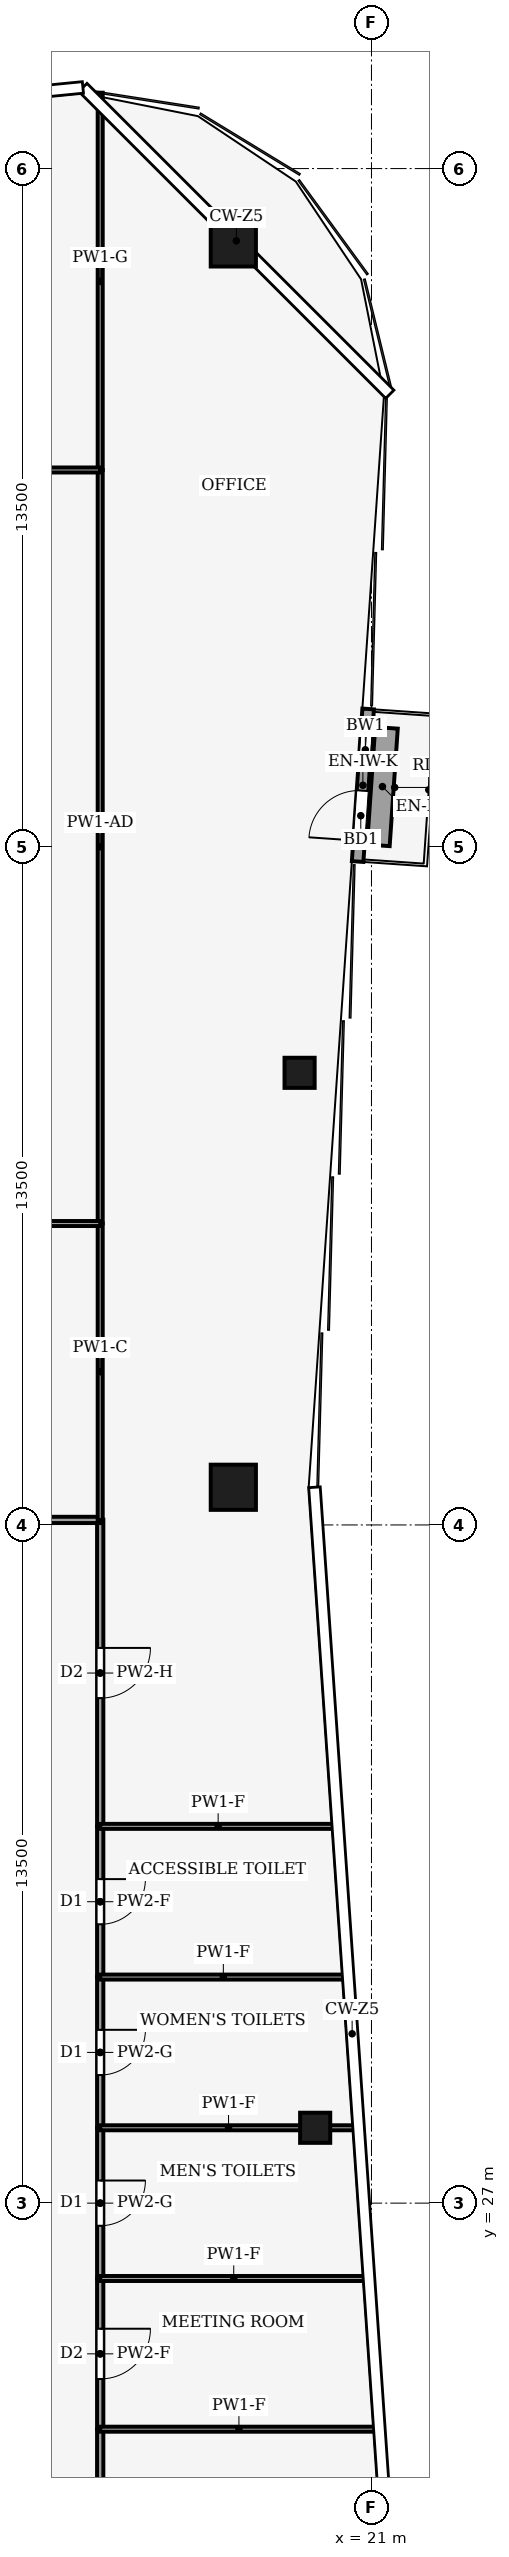
"""IFC4 building model, lengths in metres.
Left out: names, types, materials, properties, quantities, classifications, styles, units other than length and angle.
Written with IfcOpenShell. Run it as: python <this file> out.ifc"""

import sys

from ifc_helpers import new_model, si_unit, direction, frame, frame_2d, origin, origin_2d, place, context, subcontext, project, spatial, rectangle, hollow_rectangle, extrude, element, fill, save


model = new_model("IFC4")
c1 = context("Model", 3, precision=1e-05, world=origin(), true_north=direction((0.0, 1.0)))
c2 = subcontext(c1, "Body", "Model", "MODEL_VIEW")
j1 = project(units=[si_unit("LENGTHUNIT", "METRE"), si_unit("PLANEANGLEUNIT", "RADIAN")], contexts=[c1])
p1 = place(None, origin())
s1 = spatial("IfcSite", under=j1, at=p1, CompositionType="ELEMENT")
p2 = place(p1, origin())
s2 = spatial("IfcBuilding", under=s1, at=p2, CompositionType="ELEMENT")
p3 = place(p2, frame((0.0, 0.0, 310.0)))
s3 = spatial("IfcBuildingStorey", under=s2, at=p3, CompositionType="ELEMENT", Elevation=310.0)
for number, where, z_axis, x_axis in (
    (1, (18.25, 66.0, 0.0), (0.0, 0.0, 1.0), (1.0, 0.0, 0.0)),
    (2, (18.25, 41.25, 0.0), (0.0, 0.0, 1.0), (1.0, 0.0, 0.0)),
):
    element("IfcColumn", number, at=place(p3, frame(where, z_axis=z_axis, x_axis=x_axis)), inside=s3, PredefinedType="COLUMN", context=c2, shape_type="SweptSolid", body=[
        extrude(hollow_rectangle(XDim=0.9, YDim=0.9, WallThickness=0.04, at=origin_2d()), origin(), (0.0, 0.0, 1.0), 4.0),
    ])
for number, where, z_axis, x_axis in (
    (3, (19.879, 28.5, 0.0), (0.0, 0.0, 1.0), (1.0, 0.0, 0.0)),
    (4, (19.569, 49.5, 0.0), (0.0, 0.0, 1.0), (1.0, 0.0, 0.0)),
):
    element("IfcColumn", number, at=place(p3, frame(where, z_axis=z_axis, x_axis=x_axis)), inside=s3, PredefinedType="COLUMN", context=c2, shape_type="SweptSolid", body=[
        extrude(hollow_rectangle(XDim=0.6, YDim=0.6, WallThickness=0.025, at=origin_2d()), origin(), (0.0, 0.0, 1.0), 4.0),
    ])
p4 = place(p3, frame((20.724, 53.706, 0.0), z_axis=(0.0, 0.0, 1.0), x_axis=(0.068802091615, 0.997630328423, 0.0)))
e5 = element("IfcWall", 5, at=p4, inside=s3, PredefinedType="SOLIDWALL", context=c2, shape_type="SweptSolid", body=[
    extrude(rectangle(XDim=3.045, YDim=0.23, at=frame_2d((1.522, 0.0))), origin(), (0.0, 0.0, 1.0), 3.65),
])
p5 = place(p4, frame((0.415, 0.0, 0.0)))
e6 = element("IfcOpeningElement", 6, at=p5, cuts=e5, PredefinedType="OPENING", context=c2, shape_type="SweptSolid", body=[
    extrude(rectangle(XDim=1.0, YDim=2.1, at=frame_2d((0.5, 1.05))), frame((0.0, 0.125, 0.0), z_axis=(0.0, -1.0, 0.0), x_axis=(1.0, 0.0, 0.0)), (0.0, 0.0, 1.0), 0.25),
])
p6 = place(p4, frame((1.83, 0.0, 0.9)))
e7 = element("IfcOpeningElement", 7, at=p6, cuts=e5, PredefinedType="OPENING", context=c2, shape_type="SweptSolid", body=[
    extrude(rectangle(XDim=0.8, YDim=1.2, at=frame_2d((0.4, 0.6))), frame((0.0, 0.125, 0.0), z_axis=(0.0, -1.0, 0.0), x_axis=(1.0, 0.0, 0.0)), (0.0, 0.0, 1.0), 0.25),
])
p7 = place(p3, frame((21.137, 54.028, 0.0), z_axis=(0.0, 0.0, 1.0), x_axis=(0.068827106414, 0.997628602949, 0.0)))
e8 = element("IfcWall", 8, at=p7, inside=s3, PredefinedType="USERDEFINED", context=c2, shape_type="SweptSolid", body=[
    extrude(rectangle(XDim=2.345, YDim=0.45, at=frame_2d((1.172, 0.0))), origin(), (0.0, 0.0, 1.0), 0.4),
])
p8 = place(p3, frame((15.6, 22.5, 0.0), z_axis=(0.0, 0.0, 1.0), x_axis=(0.0, -1.0, 0.0)))
e9 = element("IfcWall", 9, at=p8, inside=s3, PredefinedType="PARTITIONING", context=c2, shape_type="SweptSolid", body=[
    extrude(rectangle(XDim=9.01, YDim=0.125, at=frame_2d((4.505, 0.0))), origin(), (0.0, 0.0, 1.0), 2.93),
])
p9 = place(p8, frame((2.74, 0.0, 0.0)))
e10 = element("IfcOpeningElement", 10, at=p9, cuts=e9, PredefinedType="OPENING", context=c2, shape_type="SweptSolid", body=[
    extrude(rectangle(XDim=1.0, YDim=2.1, at=frame_2d((0.5, 1.05))), frame((0.0, 0.073, 0.0), z_axis=(0.0, -1.0, 0.0), x_axis=(1.0, 0.0, 0.0)), (0.0, 0.0, 1.0), 0.145),
])
p10 = place(p3, frame((15.6, 25.5, 0.0), z_axis=(0.0, 0.0, 1.0), x_axis=(0.0, -1.0, 0.0)))
e11 = element("IfcWall", 11, at=p10, inside=s3, PredefinedType="PARTITIONING", context=c2, shape_type="SweptSolid", body=[
    extrude(rectangle(XDim=3.0, YDim=0.125, at=frame_2d((1.5, 0.0))), origin(), (0.0, 0.0, 1.0), 3.54),
])
p11 = place(p10, frame((1.0, 0.0, 0.0)))
e12 = element("IfcOpeningElement", 12, at=p11, cuts=e11, PredefinedType="OPENING", context=c2, shape_type="SweptSolid", body=[
    extrude(rectangle(XDim=1.0, YDim=2.1, at=frame_2d((0.5, 1.05))), frame((0.0, 0.073, 0.0), z_axis=(0.0, -1.0, 0.0), x_axis=(1.0, 0.0, 0.0)), (0.0, 0.0, 1.0), 0.145),
])
p12 = place(p3, frame((15.6, 28.5, 0.0), z_axis=(0.0, 0.0, 1.0), x_axis=(0.0, -1.0, 0.0)))
e13 = element("IfcWall", 13, at=p12, inside=s3, PredefinedType="PARTITIONING", context=c2, shape_type="SweptSolid", body=[
    extrude(rectangle(XDim=3.0, YDim=0.125, at=frame_2d((1.5, 0.0))), origin(), (0.0, 0.0, 1.0), 3.87),
])
p13 = place(p12, frame((1.05, 0.0, 0.0)))
e14 = element("IfcOpeningElement", 14, at=p13, cuts=e13, PredefinedType="OPENING", context=c2, shape_type="SweptSolid", body=[
    extrude(rectangle(XDim=0.9, YDim=2.1, at=frame_2d((0.45, 1.05))), frame((0.0, 0.073, 0.0), z_axis=(0.0, -1.0, 0.0), x_axis=(1.0, 0.0, 0.0)), (0.0, 0.0, 1.0), 0.145),
])
p14 = place(p3, frame((15.6, 31.5, 0.0), z_axis=(0.0, 0.0, 1.0), x_axis=(0.0, -1.0, 0.0)))
e15 = element("IfcWall", 15, at=p14, inside=s3, PredefinedType="PARTITIONING", context=c2, shape_type="SweptSolid", body=[
    extrude(rectangle(XDim=3.0, YDim=0.125, at=frame_2d((1.5, 0.0))), origin(), (0.0, 0.0, 1.0), 3.87),
])
p15 = place(p14, frame((1.05, 0.0, 0.0)))
e16 = element("IfcOpeningElement", 16, at=p15, cuts=e15, PredefinedType="OPENING", context=c2, shape_type="SweptSolid", body=[
    extrude(rectangle(XDim=0.9, YDim=2.1, at=frame_2d((0.45, 1.05))), frame((0.0, 0.073, 0.0), z_axis=(0.0, -1.0, 0.0), x_axis=(1.0, 0.0, 0.0)), (0.0, 0.0, 1.0), 0.145),
])
p16 = place(p3, frame((15.6, 34.5, 0.0), z_axis=(0.0, 0.0, 1.0), x_axis=(0.0, -1.0, 0.0)))
e17 = element("IfcWall", 17, at=p16, inside=s3, PredefinedType="PARTITIONING", context=c2, shape_type="SweptSolid", body=[
    extrude(rectangle(XDim=3.0, YDim=0.125, at=frame_2d((1.5, 0.0))), origin(), (0.0, 0.0, 1.0), 3.54),
])
p17 = place(p16, frame((1.05, 0.0, 0.0)))
e18 = element("IfcOpeningElement", 18, at=p17, cuts=e17, PredefinedType="OPENING", context=c2, shape_type="SweptSolid", body=[
    extrude(rectangle(XDim=0.9, YDim=2.1, at=frame_2d((0.45, 1.05))), frame((0.0, 0.073, 0.0), z_axis=(0.0, -1.0, 0.0), x_axis=(1.0, 0.0, 0.0)), (0.0, 0.0, 1.0), 0.145),
])
p18 = place(p3, frame((15.6, 40.604, 0.0), z_axis=(0.0, 0.0, 1.0), x_axis=(0.0, -1.0, 0.0)))
e19 = element("IfcWall", 19, at=p18, inside=s3, PredefinedType="PARTITIONING", context=c2, shape_type="SweptSolid", body=[
    extrude(rectangle(XDim=6.104, YDim=0.125, at=frame_2d((3.052, 0.0))), origin(), (0.0, 0.0, 1.0), 3.14),
])
p19 = place(p18, frame((2.552, 0.0, 0.0)))
e20 = element("IfcOpeningElement", 20, at=p19, cuts=e19, PredefinedType="OPENING", context=c2, shape_type="SweptSolid", body=[
    extrude(rectangle(XDim=1.0, YDim=2.1, at=frame_2d((0.5, 1.05))), frame((0.0, 0.073, 0.0), z_axis=(0.0, -1.0, 0.0), x_axis=(1.0, 0.0, 0.0)), (0.0, 0.0, 1.0), 0.145),
])
p20 = place(p3, frame((15.6, 40.6, 0.0), z_axis=(0.0, 0.0, 1.0), x_axis=(-1.0, 0.0, 0.0)))
e21 = element("IfcWall", 21, at=p20, inside=s3, PredefinedType="PARTITIONING", context=c2, shape_type="SweptSolid", body=[
    extrude(rectangle(XDim=3.6, YDim=0.125, at=frame_2d((1.8, 0.0))), origin(), (0.0, 0.0, 1.0), 3.39),
])
p21 = place(p3, frame((21.123, 22.5, 0.0), z_axis=(0.0, 0.0, 1.0), x_axis=(-1.0, 0.0, 0.0)))
e22 = element("IfcWall", 22, at=p21, inside=s3, PredefinedType="PARTITIONING", context=c2, shape_type="SweptSolid", body=[
    extrude(rectangle(XDim=5.523, YDim=0.1, at=frame_2d((2.761, 0.0))), origin(), (0.0, 0.0, 1.0), 3.04),
])
p22 = place(p3, frame((20.916, 25.5, 0.0), z_axis=(0.0, 0.0, 1.0), x_axis=(-1.0, 0.0, 0.0)))
e23 = element("IfcWall", 23, at=p22, inside=s3, PredefinedType="PARTITIONING", context=c2, shape_type="SweptSolid", body=[
    extrude(rectangle(XDim=5.316, YDim=0.1, at=frame_2d((2.658, 0.0))), origin(), (0.0, 0.0, 1.0), 3.04),
])
p23 = place(p3, frame((20.709, 28.5, 0.0), z_axis=(0.0, 0.0, 1.0), x_axis=(-1.0, 0.0, 0.0)))
e24 = element("IfcWall", 24, at=p23, inside=s3, PredefinedType="PARTITIONING", context=c2, shape_type="SweptSolid", body=[
    extrude(rectangle(XDim=5.109, YDim=0.1, at=frame_2d((2.555, 0.0))), origin(), (0.0, 0.0, 1.0), 3.04),
])
p24 = place(p3, frame((20.502, 31.5, 0.0), z_axis=(0.0, 0.0, 1.0), x_axis=(-1.0, 0.0, 0.0)))
e25 = element("IfcWall", 25, at=p24, inside=s3, PredefinedType="PARTITIONING", context=c2, shape_type="SweptSolid", body=[
    extrude(rectangle(XDim=4.902, YDim=0.1, at=frame_2d((2.451, 0.0))), origin(), (0.0, 0.0, 1.0), 3.04),
])
p25 = place(p3, frame((20.295, 34.5, 0.0), z_axis=(0.0, 0.0, 1.0), x_axis=(-1.0, 0.0, 0.0)))
e26 = element("IfcWall", 26, at=p25, inside=s3, PredefinedType="PARTITIONING", context=c2, shape_type="SweptSolid", body=[
    extrude(rectangle(XDim=4.695, YDim=0.1, at=frame_2d((2.348, 0.0))), origin(), (0.0, 0.0, 1.0), 3.04),
])
p26 = place(p3, frame((15.6, 46.5, 0.0), z_axis=(0.0, 0.0, 1.0), x_axis=(0.0, -1.0, 0.0)))
e27 = element("IfcWall", 27, at=p26, inside=s3, PredefinedType="PARTITIONING", context=c2, shape_type="SweptSolid", body=[
    extrude(rectangle(XDim=5.9, YDim=0.1, at=frame_2d((2.95, 0.0))), origin(), (0.0, 0.0, 1.0), 3.87),
])
p27 = place(p3, frame((15.6, 61.5, 0.0), z_axis=(0.0, 0.0, 1.0), x_axis=(0.0, -1.0, 0.0)))
e28 = element("IfcWall", 28, at=p27, inside=s3, PredefinedType="PARTITIONING", context=c2, shape_type="SweptSolid", body=[
    extrude(rectangle(XDim=15.0, YDim=0.1, at=frame_2d((7.5, 0.0))), origin(), (0.0, 0.0, 1.0), 3.35),
])
p28 = place(p3, frame((15.6, 69.01, 0.0), z_axis=(0.0, 0.0, 1.0), x_axis=(0.0, -1.0, 0.0)))
e29 = element("IfcWall", 29, at=p28, inside=s3, PredefinedType="PARTITIONING", context=c2, shape_type="SweptSolid", body=[
    extrude(rectangle(XDim=7.51, YDim=0.1, at=frame_2d((3.755, 0.0))), origin(), (0.0, 0.0, 1.0), 2.93),
])
p29 = place(p3, frame((15.6, 46.5, 0.0), z_axis=(0.0, 0.0, 1.0), x_axis=(-1.0, 0.0, 0.0)))
e30 = element("IfcWall", 30, at=p29, inside=s3, PredefinedType="PARTITIONING", context=c2, shape_type="SweptSolid", body=[
    extrude(rectangle(XDim=3.604, YDim=0.1, at=frame_2d((1.802, 0.0))), origin(), (0.0, 0.0, 1.0), 3.87),
])
p30 = place(p3, frame((6.0, 61.5, 0.0), z_axis=(0.0, 0.0, 1.0), x_axis=(1.0, 0.0, 0.0)))
e31 = element("IfcWall", 31, at=p30, inside=s3, PredefinedType="PARTITIONING", context=c2, shape_type="SweptSolid", body=[
    extrude(rectangle(XDim=9.6, YDim=0.1, at=frame_2d((4.8, 0.0))), origin(), (0.0, 0.0, 1.0), 3.24),
])
p31 = place(p30, frame((4.3, 0.0, 0.0)))
e32 = element("IfcOpeningElement", 32, at=p31, cuts=e31, PredefinedType="OPENING", context=c2, shape_type="SweptSolid", body=[
    extrude(rectangle(XDim=1.0, YDim=2.1, at=frame_2d((0.5, 1.05))), frame((0.0, 0.06, 0.0), z_axis=(0.0, -1.0, 0.0), x_axis=(1.0, 0.0, 0.0)), (0.0, 0.0, 1.0), 0.12),
])
p32 = place(p5, origin())
e33 = element("IfcDoor", 33, at=p32, inside=s3, OperationType="SINGLE_SWING_LEFT", PredefinedType="DOOR", context=c2, shape_type="SweptSolid", body=[
    extrude(rectangle(XDim=1.0, YDim=2.1, at=frame_2d((0.5, 1.05))), frame((0.0, 0.025, 0.0), z_axis=(0.0, -1.0, 0.0), x_axis=(1.0, 0.0, 0.0)), (0.0, 0.0, 1.0), 0.05),
])
fill(e6, e33)
p33 = place(p6, origin())
e34 = element("IfcWindow", 34, at=p33, inside=s3, PartitioningType="SINGLE_PANEL", PredefinedType="WINDOW", context=c2, shape_type="SweptSolid", body=[
    extrude(rectangle(XDim=0.8, YDim=1.2, at=frame_2d((0.4, 0.6))), frame((0.0, 0.03, 0.0), z_axis=(0.0, -1.0, 0.0), x_axis=(1.0, 0.0, 0.0)), (0.0, 0.0, 1.0), 0.06),
])
fill(e7, e34)
p34 = place(p11, origin())
e35 = element("IfcDoor", 35, at=p34, inside=s3, OperationType="SINGLE_SWING_LEFT", PredefinedType="DOOR", context=c2, shape_type="SweptSolid", body=[
    extrude(rectangle(XDim=1.0, YDim=2.1, at=frame_2d((0.5, 1.05))), frame((0.0, 0.025, 0.0), z_axis=(0.0, -1.0, 0.0), x_axis=(1.0, 0.0, 0.0)), (0.0, 0.0, 1.0), 0.05),
])
fill(e12, e35)
p35 = place(p13, origin())
e36 = element("IfcDoor", 36, at=p35, inside=s3, OperationType="SINGLE_SWING_RIGHT", PredefinedType="DOOR", context=c2, shape_type="SweptSolid", body=[
    extrude(rectangle(XDim=0.9, YDim=2.1, at=frame_2d((0.45, 1.05))), frame((0.0, 0.025, 0.0), z_axis=(0.0, -1.0, 0.0), x_axis=(1.0, 0.0, 0.0)), (0.0, 0.0, 1.0), 0.05),
])
fill(e14, e36)
p36 = place(p15, origin())
e37 = element("IfcDoor", 37, at=p36, inside=s3, OperationType="SINGLE_SWING_LEFT", PredefinedType="DOOR", context=c2, shape_type="SweptSolid", body=[
    extrude(rectangle(XDim=0.9, YDim=2.1, at=frame_2d((0.45, 1.05))), frame((0.0, 0.025, 0.0), z_axis=(0.0, -1.0, 0.0), x_axis=(1.0, 0.0, 0.0)), (0.0, 0.0, 1.0), 0.05),
])
fill(e16, e37)
p37 = place(p17, origin())
e38 = element("IfcDoor", 38, at=p37, inside=s3, OperationType="SINGLE_SWING_RIGHT", PredefinedType="DOOR", context=c2, shape_type="SweptSolid", body=[
    extrude(rectangle(XDim=0.9, YDim=2.1, at=frame_2d((0.45, 1.05))), frame((0.0, 0.025, 0.0), z_axis=(0.0, -1.0, 0.0), x_axis=(1.0, 0.0, 0.0)), (0.0, 0.0, 1.0), 0.05),
])
fill(e18, e38)
p38 = place(p19, origin())
e39 = element("IfcDoor", 39, at=p38, inside=s3, OperationType="SINGLE_SWING_LEFT", PredefinedType="DOOR", context=c2, shape_type="SweptSolid", body=[
    extrude(rectangle(XDim=1.0, YDim=2.1, at=frame_2d((0.5, 1.05))), frame((0.0, 0.025, 0.0), z_axis=(0.0, -1.0, 0.0), x_axis=(1.0, 0.0, 0.0)), (0.0, 0.0, 1.0), 0.05),
])
fill(e20, e39)
save(model, sys.argv[1])
